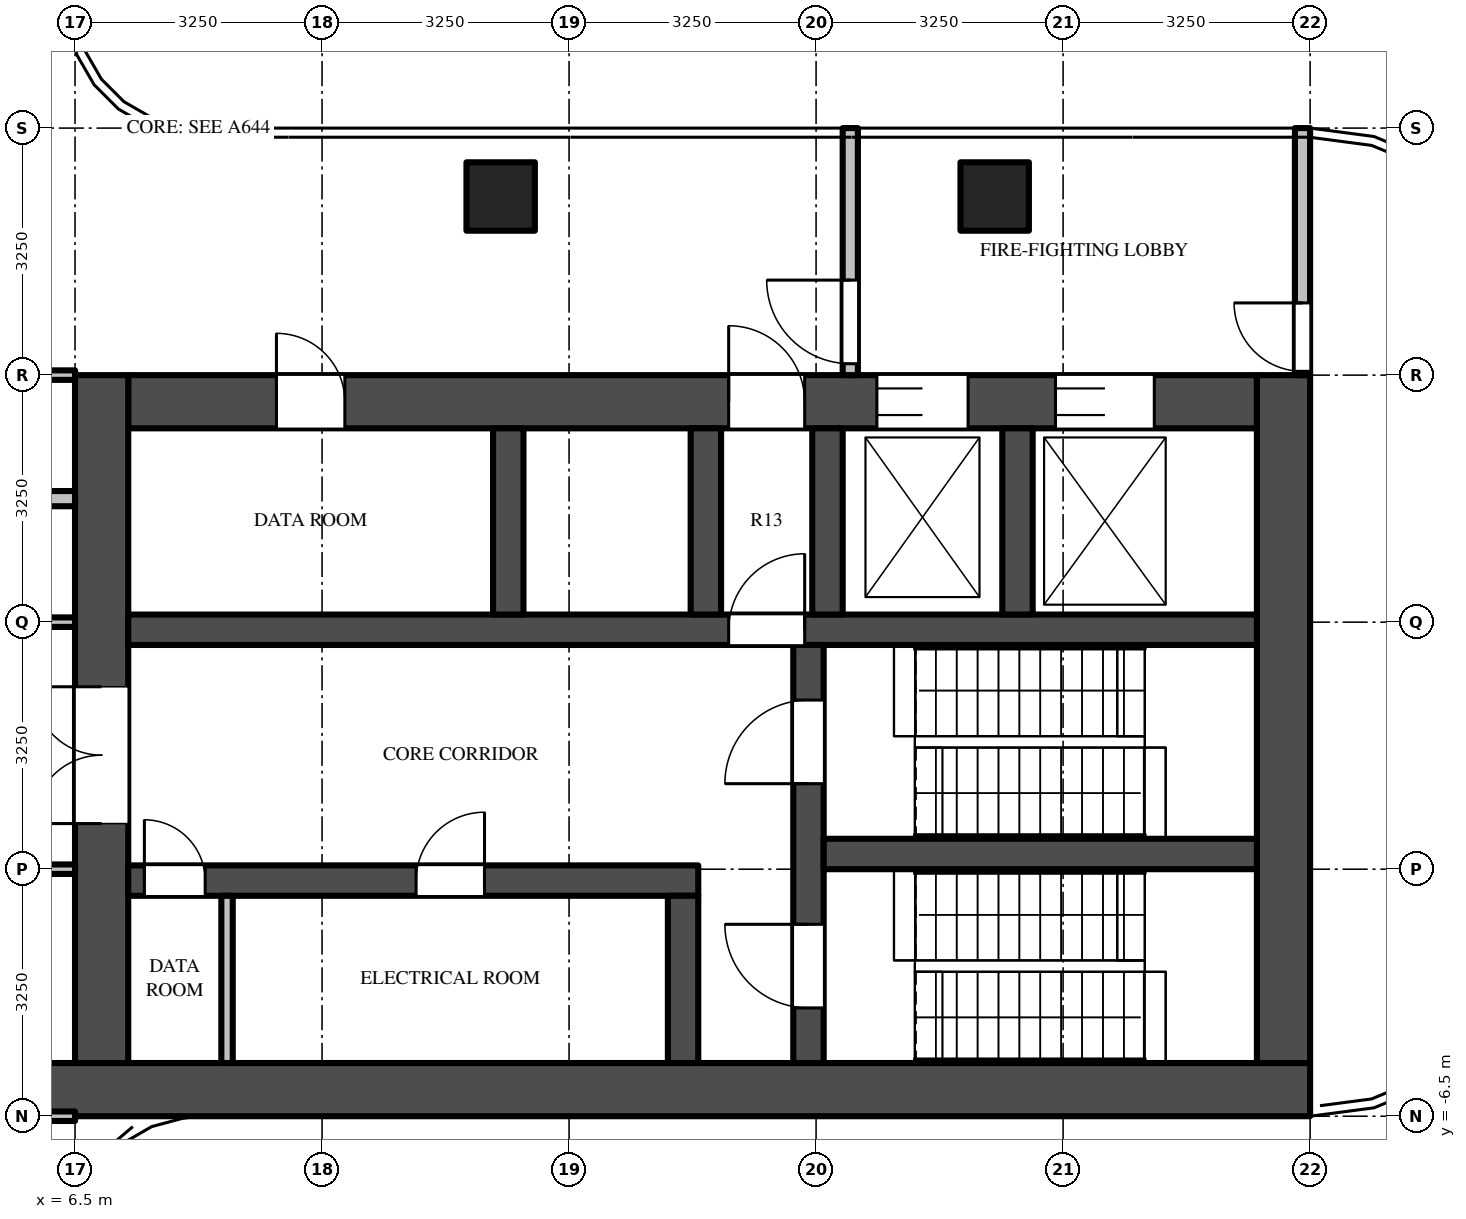
"""IFC4 building model, lengths in metres.
Left out: names, types, materials, properties, quantities, classifications, styles, units other than length and angle.
Written with IfcOpenShell. Run it as: python <this file> out.ifc"""

import sys

from ifc_helpers import new_model, si_unit, direction, frame, frame_2d, origin, origin_2d, place, context, subcontext, project, spatial, rectangle, extrude, source, transform, mapped, element, fill, save


model = new_model("IFC4")
c1 = context("Model", 3, precision=1e-05, world=origin(), true_north=direction((0.0, 1.0)))
c2 = subcontext(c1, "Body", "Model", "MODEL_VIEW")
j1 = project(units=[si_unit("LENGTHUNIT", "METRE"), si_unit("PLANEANGLEUNIT", "RADIAN")], contexts=[c1])
p1 = place(None, origin())
s1 = spatial("IfcSite", under=j1, at=p1, CompositionType="ELEMENT")
p2 = place(p1, origin())
s2 = spatial("IfcBuilding", under=s1, at=p2, CompositionType="ELEMENT")
p3 = place(p2, frame((0.0, 0.0, 330.1)))
s3 = spatial("IfcBuildingStorey", under=s2, at=p3, CompositionType="ELEMENT", Elevation=330.1)
m1 = source(origin(), c2, "Body", "SweptSolid", [
    extrude(rectangle(XDim=0.9, YDim=0.9, at=origin_2d()), origin(), (0.0, 0.0, 1.0), 8.0),
])
for number, where, z_axis, x_axis in (
    (1, (12.1, 5.6, 0.0), (0.0, 0.0, 1.0), (1.0, 0.0, 0.0)),
    (2, (18.6, 5.6, 0.0), (0.0, 0.0, 1.0), (1.0, 0.0, 0.0)),
):
    element("IfcColumn", number, at=place(p3, frame(where, z_axis=z_axis, x_axis=x_axis)), inside=s3, PredefinedType="COLUMN", context=c2, shape_type="MappedRepresentation", body=[
        mapped(m1, transform((0.0, 0.0, 0.0))),
    ])
m2 = source(origin(), c2, "Body", "SweptSolid", [
    extrude(rectangle(XDim=16.7, YDim=0.7, at=frame_2d((8.35, 0.0))), origin(), (0.0, 0.0, 1.0), 7.75),
])
p4 = place(p3, frame((6.05, -6.15, 0.0), z_axis=(0.0, 0.0, 1.0), x_axis=(1.0, 0.0, 0.0)))
e3 = element("IfcWall", 3, at=p4, inside=s3, PredefinedType="SHEAR", context=c2, shape_type="MappedRepresentation", body=[
    mapped(m2, transform((0.0, 0.0, 0.0))),
])
m3 = source(origin(), c2, "Body", "SweptSolid", [
    extrude(rectangle(XDim=14.85, YDim=0.7, at=frame_2d((7.425, 0.0))), origin(), (0.0, 0.0, 1.0), 7.75),
])
p5 = place(p3, frame((7.2, 2.9, 0.0), z_axis=(0.0, 0.0, 1.0), x_axis=(1.0, 0.0, 0.0)))
e4 = element("IfcWall", 4, at=p5, inside=s3, PredefinedType="SHEAR", context=c2, shape_type="MappedRepresentation", body=[
    mapped(m3, transform((0.0, 0.0, 0.0))),
])
m4 = source(origin(), c2, "Body", "SweptSolid", [
    extrude(rectangle(XDim=1.3, YDim=2.1, at=frame_2d((0.65, 1.05))), frame((0.0, 0.36, 0.0), z_axis=(0.0, -1.0, 0.0), x_axis=(1.0, 0.0, 0.0)), (0.0, 0.0, 1.0), 0.72),
])
p6 = place(p5, frame((12.2, 0.0, 0.0)))
e5 = element("IfcOpeningElement", 5, at=p6, cuts=e4, PredefinedType="OPENING", context=c2, shape_type="MappedRepresentation", body=[
    mapped(m4, transform((0.0, 0.0, 0.0))),
])
m5 = source(origin(), c2, "Body", "SweptSolid", [
    extrude(rectangle(XDim=1.2, YDim=2.1, at=frame_2d((0.6, 1.05))), frame((0.0, 0.36, 0.0), z_axis=(0.0, -1.0, 0.0), x_axis=(1.0, 0.0, 0.0)), (0.0, 0.0, 1.0), 0.72),
])
p7 = place(p5, frame((9.85, 0.0, 0.0)))
e6 = element("IfcOpeningElement", 6, at=p7, cuts=e4, PredefinedType="OPENING", context=c2, shape_type="MappedRepresentation", body=[
    mapped(m5, transform((0.0, 0.0, 0.0))),
])
m6 = source(origin(), c2, "Body", "SweptSolid", [
    extrude(rectangle(XDim=1.0, YDim=2.1, at=frame_2d((0.5, 1.05))), frame((0.0, 0.36, 0.0), z_axis=(0.0, -1.0, 0.0), x_axis=(1.0, 0.0, 0.0)), (0.0, 0.0, 1.0), 0.72),
])
p8 = place(p5, frame((7.9, 0.0, 0.0)))
e7 = element("IfcOpeningElement", 7, at=p8, cuts=e4, PredefinedType="OPENING", context=c2, shape_type="MappedRepresentation", body=[
    mapped(m6, transform((0.0, 0.0, 0.0))),
])
m7 = source(origin(), c2, "Body", "SweptSolid", [
    extrude(rectangle(XDim=0.9, YDim=2.1, at=frame_2d((0.45, 1.05))), frame((0.0, 0.36, 0.0), z_axis=(0.0, -1.0, 0.0), x_axis=(1.0, 0.0, 0.0)), (0.0, 0.0, 1.0), 0.72),
])
p9 = place(p5, frame((1.95, 0.0, 0.0)))
e8 = element("IfcOpeningElement", 8, at=p9, cuts=e4, PredefinedType="OPENING", context=c2, shape_type="MappedRepresentation", body=[
    mapped(m7, transform((0.0, 0.0, 0.0))),
])
m8 = source(origin(), c2, "Body", "SweptSolid", [
    extrude(rectangle(XDim=9.05, YDim=0.7, at=frame_2d((4.525, 0.0))), origin(), (0.0, 0.0, 1.0), 7.75),
])
p10 = place(p3, frame((6.85, -5.8, 0.0), z_axis=(0.0, 0.0, 1.0), x_axis=(0.0, 1.0, 0.0)))
e9 = element("IfcWall", 9, at=p10, inside=s3, PredefinedType="SHEAR", context=c2, shape_type="MappedRepresentation", body=[
    mapped(m8, transform((0.0, 0.0, 0.0))),
])
m9 = source(origin(), c2, "Body", "SweptSolid", [
    extrude(rectangle(XDim=1.8, YDim=2.1, at=frame_2d((0.9, 1.05))), frame((0.0, 0.36, 0.0), z_axis=(0.0, -1.0, 0.0), x_axis=(1.0, 0.0, 0.0)), (0.0, 0.0, 1.0), 0.72),
])
p11 = place(p10, frame((3.15, 0.0, 0.0)))
e10 = element("IfcOpeningElement", 10, at=p11, cuts=e9, PredefinedType="OPENING", context=c2, shape_type="MappedRepresentation", body=[
    mapped(m9, transform((0.0, 0.0, 0.0))),
])
p12 = place(p3, frame((22.4, -5.8, 0.0), z_axis=(0.0, 0.0, 1.0), x_axis=(0.0, 1.0, 0.0)))
e11 = element("IfcWall", 11, at=p12, inside=s3, PredefinedType="SHEAR", context=c2, shape_type="MappedRepresentation", body=[
    mapped(m8, transform((0.0, 0.0, 0.0))),
])
m10 = source(origin(), c2, "Body", "SweptSolid", [
    extrude(rectangle(XDim=7.5, YDim=0.4, at=frame_2d((3.75, 0.0))), origin(), (0.0, 0.0, 1.0), 7.75),
])
p13 = place(p3, frame((7.2, -3.4, 0.0), z_axis=(0.0, 0.0, 1.0), x_axis=(1.0, 0.0, 0.0)))
e12 = element("IfcWall", 12, at=p13, inside=s3, PredefinedType="SHEAR", context=c2, shape_type="MappedRepresentation", body=[
    mapped(m10, transform((0.0, 0.0, 0.0))),
])
m11 = source(origin(), c2, "Body", "SweptSolid", [
    extrude(rectangle(XDim=0.8, YDim=2.1, at=frame_2d((0.4, 1.05))), frame((0.0, 0.21, 0.0), z_axis=(0.0, -1.0, 0.0), x_axis=(1.0, 0.0, 0.0)), (0.0, 0.0, 1.0), 0.42),
])
p14 = place(p13, frame((0.212, 0.0, 0.0)))
e13 = element("IfcOpeningElement", 13, at=p14, cuts=e12, PredefinedType="OPENING", context=c2, shape_type="MappedRepresentation", body=[
    mapped(m11, transform((0.0, 0.0, 0.0))),
])
m12 = source(origin(), c2, "Body", "SweptSolid", [
    extrude(rectangle(XDim=0.9, YDim=2.1, at=frame_2d((0.45, 1.05))), frame((0.0, 0.21, 0.0), z_axis=(0.0, -1.0, 0.0), x_axis=(1.0, 0.0, 0.0)), (0.0, 0.0, 1.0), 0.42),
])
p15 = place(p13, frame((3.788, 0.0, 0.0)))
e14 = element("IfcOpeningElement", 14, at=p15, cuts=e12, PredefinedType="OPENING", context=c2, shape_type="MappedRepresentation", body=[
    mapped(m12, transform((0.0, 0.0, 0.0))),
])
m13 = source(origin(), c2, "Body", "SweptSolid", [
    extrude(rectangle(XDim=14.85, YDim=0.4, at=frame_2d((7.425, 0.0))), origin(), (0.0, 0.0, 1.0), 7.75),
])
p16 = place(p3, frame((7.2, -0.1, 0.0), z_axis=(0.0, 0.0, 1.0), x_axis=(1.0, 0.0, 0.0)))
e15 = element("IfcWall", 15, at=p16, inside=s3, PredefinedType="SHEAR", context=c2, shape_type="MappedRepresentation", body=[
    mapped(m13, transform((0.0, 0.0, 0.0))),
])
m14 = source(origin(), c2, "Body", "SweptSolid", [
    extrude(rectangle(XDim=1.0, YDim=2.1, at=frame_2d((0.5, 1.05))), frame((0.0, 0.21, 0.0), z_axis=(0.0, -1.0, 0.0), x_axis=(1.0, 0.0, 0.0)), (0.0, 0.0, 1.0), 0.42),
])
p17 = place(p16, frame((7.9, 0.0, 0.0)))
e16 = element("IfcOpeningElement", 16, at=p17, cuts=e15, PredefinedType="OPENING", context=c2, shape_type="MappedRepresentation", body=[
    mapped(m14, transform((0.0, 0.0, 0.0))),
])
m15 = source(origin(), c2, "Body", "SweptSolid", [
    extrude(rectangle(XDim=5.5, YDim=0.4, at=frame_2d((2.75, 0.0))), origin(), (0.0, 0.0, 1.0), 7.75),
])
p18 = place(p3, frame((16.15, -5.8, 0.0), z_axis=(0.0, 0.0, 1.0), x_axis=(0.0, 1.0, 0.0)))
e17 = element("IfcWall", 17, at=p18, inside=s3, PredefinedType="SHEAR", context=c2, shape_type="MappedRepresentation", body=[
    mapped(m15, transform((0.0, 0.0, 0.0))),
])
m16 = source(origin(), c2, "Body", "SweptSolid", [
    extrude(rectangle(XDim=1.1, YDim=2.1, at=frame_2d((0.55, 1.05))), frame((0.0, 0.21, 0.0), z_axis=(0.0, -1.0, 0.0), x_axis=(1.0, 0.0, 0.0)), (0.0, 0.0, 1.0), 0.42),
])
p19 = place(p18, frame((0.725, 0.0, 0.0)))
e18 = element("IfcOpeningElement", 18, at=p19, cuts=e17, PredefinedType="OPENING", context=c2, shape_type="MappedRepresentation", body=[
    mapped(m16, transform((0.0, 0.0, 0.0))),
])
p20 = place(p18, frame((3.675, 0.0, 0.0)))
e19 = element("IfcOpeningElement", 19, at=p20, cuts=e17, PredefinedType="OPENING", context=c2, shape_type="MappedRepresentation", body=[
    mapped(m16, transform((0.0, 0.0, 0.0))),
])
m17 = source(origin(), c2, "Body", "SweptSolid", [
    extrude(rectangle(XDim=5.7, YDim=0.4, at=frame_2d((2.85, 0.0))), origin(), (0.0, 0.0, 1.0), 7.75),
])
p21 = place(p3, frame((16.35, -3.05, 0.0), z_axis=(0.0, 0.0, 1.0), x_axis=(1.0, 0.0, 0.0)))
e20 = element("IfcWall", 20, at=p21, inside=s3, PredefinedType="SHEAR", context=c2, shape_type="MappedRepresentation", body=[
    mapped(m17, transform((0.0, 0.0, 0.0))),
])
m18 = source(origin(), c2, "Body", "SweptSolid", [
    extrude(rectangle(XDim=2.2, YDim=0.4, at=frame_2d((1.1, 0.0))), origin(), (0.0, 0.0, 1.0), 7.75),
])
p22 = place(p3, frame((14.5, -5.8, 0.0), z_axis=(0.0, 0.0, 1.0), x_axis=(0.0, 1.0, 0.0)))
e21 = element("IfcWall", 21, at=p22, inside=s3, PredefinedType="SHEAR", context=c2, shape_type="MappedRepresentation", body=[
    mapped(m18, transform((0.0, 0.0, 0.0))),
])
m19 = source(origin(), c2, "Body", "SweptSolid", [
    extrude(rectangle(XDim=2.45, YDim=0.4, at=frame_2d((1.225, 0.0))), origin(), (0.0, 0.0, 1.0), 7.75),
])
for number, where, z_axis, x_axis in (
    (22, (12.2, 0.1, 0.0), (0.0, 0.0, 1.0), (0.0, 1.0, 0.0)),
    (23, (14.8, 0.1, 0.0), (0.0, 0.0, 1.0), (0.0, 1.0, 0.0)),
    (24, (16.4, 0.1, 0.0), (0.0, 0.0, 1.0), (0.0, 1.0, 0.0)),
    (25, (18.9, 0.1, 0.0), (0.0, 0.0, 1.0), (0.0, 1.0, 0.0)),
):
    element("IfcWall", number, at=place(p3, frame(where, z_axis=z_axis, x_axis=x_axis)), inside=s3, PredefinedType="SHEAR", context=c2, shape_type="MappedRepresentation", body=[
        mapped(m19, transform((0.0, 0.0, 0.0))),
    ])
m20 = source(origin(), c2, "Body", "SweptSolid", [
    extrude(rectangle(XDim=3.25, YDim=0.2, at=frame_2d((1.625, 0.0))), origin(), (0.0, 0.0, 1.0), 7.75),
])
p23 = place(p3, frame((16.7, 3.25, 0.0), z_axis=(0.0, 0.0, 1.0), x_axis=(0.0, 1.0, 0.0)))
e26 = element("IfcWall", 26, at=p23, inside=s3, PredefinedType="PARTITIONING", context=c2, shape_type="MappedRepresentation", body=[
    mapped(m20, transform((0.0, 0.0, 0.0))),
])
m21 = source(origin(), c2, "Body", "SweptSolid", [
    extrude(rectangle(XDim=1.1, YDim=2.1, at=frame_2d((0.55, 1.05))), frame((0.0, 0.11, 0.0), z_axis=(0.0, -1.0, 0.0), x_axis=(1.0, 0.0, 0.0)), (0.0, 0.0, 1.0), 0.22),
])
p24 = place(p23, frame((0.15, 0.0, 0.0)))
e27 = element("IfcOpeningElement", 27, at=p24, cuts=e26, PredefinedType="OPENING", context=c2, shape_type="MappedRepresentation", body=[
    mapped(m21, transform((0.0, 0.0, 0.0))),
])
p25 = place(p3, frame((22.65, 3.25, 0.0), z_axis=(0.0, 0.0, 1.0), x_axis=(0.0, 1.0, 0.0)))
e28 = element("IfcWall", 28, at=p25, inside=s3, PredefinedType="PARTITIONING", context=c2, shape_type="MappedRepresentation", body=[
    mapped(m20, transform((0.0, 0.0, 0.0))),
])
m22 = source(origin(), c2, "Body", "SweptSolid", [
    extrude(rectangle(XDim=0.9, YDim=2.1, at=frame_2d((0.45, 1.05))), frame((0.0, 0.11, 0.0), z_axis=(0.0, -1.0, 0.0), x_axis=(1.0, 0.0, 0.0)), (0.0, 0.0, 1.0), 0.22),
])
p26 = place(p25, frame((0.05, 0.0, 0.0)))
e29 = element("IfcOpeningElement", 29, at=p26, cuts=e28, PredefinedType="OPENING", context=c2, shape_type="MappedRepresentation", body=[
    mapped(m22, transform((0.0, 0.0, 0.0))),
])
m23 = source(origin(), c2, "Body", "SweptSolid", [
    extrude(rectangle(XDim=2.2, YDim=0.15, at=frame_2d((1.1, 0.0))), origin(), (0.0, 0.0, 1.0), 7.75),
])
p27 = place(p3, frame((8.5, -5.8, 0.0), z_axis=(0.0, 0.0, 1.0), x_axis=(0.0, 1.0, 0.0)))
e30 = element("IfcWall", 30, at=p27, inside=s3, PredefinedType="PARTITIONING", context=c2, shape_type="MappedRepresentation", body=[
    mapped(m23, transform((0.0, 0.0, 0.0))),
])
m24 = source(origin(), c2, "Body", "SweptSolid", [
    extrude(rectangle(XDim=5.363, YDim=0.125, at=frame_2d((2.681, 0.0))), origin(), (0.0, 0.0, 1.0), 6.83),
])
p28 = place(p3, frame((6.5, -6.5, 0.0), z_axis=(0.0, 0.0, 1.0), x_axis=(-1.0, 0.0, 0.0)))
e31 = element("IfcWall", 31, at=p28, inside=s3, PredefinedType="PARTITIONING", context=c2, shape_type="MappedRepresentation", body=[
    mapped(m24, transform((0.0, 0.0, 0.0))),
])
m25 = source(origin(), c2, "Body", "SweptSolid", [
    extrude(rectangle(XDim=5.363, YDim=0.125, at=frame_2d((2.681, 0.0))), origin(), (0.0, 0.0, 1.0), 7.046),
])
p29 = place(p3, frame((6.5, -3.25, 0.0), z_axis=(0.0, 0.0, 1.0), x_axis=(-1.0, 0.0, 0.0)))
e32 = element("IfcWall", 32, at=p29, inside=s3, PredefinedType="PARTITIONING", context=c2, shape_type="MappedRepresentation", body=[
    mapped(m25, transform((0.0, 0.0, 0.0))),
])
m26 = source(origin(), c2, "Body", "SweptSolid", [
    extrude(rectangle(XDim=1.0, YDim=2.1, at=frame_2d((0.5, 1.05))), frame((0.0, 0.073, 0.0), z_axis=(0.0, -1.0, 0.0), x_axis=(1.0, 0.0, 0.0)), (0.0, 0.0, 1.0), 0.145),
])
p30 = place(p29, frame((0.35, 0.0, 0.0)))
e33 = element("IfcOpeningElement", 33, at=p30, cuts=e32, PredefinedType="OPENING", context=c2, shape_type="MappedRepresentation", body=[
    mapped(m26, transform((0.0, 0.0, 0.0))),
])
p31 = place(p3, frame((1.137, 0.0, 0.0), z_axis=(0.0, 0.0, 1.0), x_axis=(1.0, 0.0, 0.0)))
e34 = element("IfcWall", 34, at=p31, inside=s3, PredefinedType="PARTITIONING", context=c2, shape_type="MappedRepresentation", body=[
    mapped(m25, transform((0.0, 0.0, 0.0))),
])
p32 = place(p31, frame((0.413, 0.0, 0.0)))
e35 = element("IfcOpeningElement", 35, at=p32, cuts=e34, PredefinedType="OPENING", context=c2, shape_type="MappedRepresentation", body=[
    mapped(m26, transform((0.0, 0.0, 0.0))),
])
p33 = place(p3, frame((1.262, 1.625, 0.0), z_axis=(0.0, 0.0, 1.0), x_axis=(1.0, 0.0, 0.0)))
e36 = element("IfcWall", 36, at=p33, inside=s3, PredefinedType="PARTITIONING", context=c2, shape_type="SweptSolid", body=[
    extrude(rectangle(XDim=5.238, YDim=0.2, at=frame_2d((2.619, 0.0))), origin(), (0.0, 0.0, 1.0), 7.046),
])
p34 = place(p3, frame((1.137, 3.25, 0.0), z_axis=(0.0, 0.0, 1.0), x_axis=(1.0, 0.0, 0.0)))
e37 = element("IfcWall", 37, at=p34, inside=s3, PredefinedType="PARTITIONING", context=c2, shape_type="MappedRepresentation", body=[
    mapped(m25, transform((0.0, 0.0, 0.0))),
])
p35 = place(p34, frame((0.413, 0.0, 0.0)))
e38 = element("IfcOpeningElement", 38, at=p35, cuts=e37, PredefinedType="OPENING", context=c2, shape_type="MappedRepresentation", body=[
    mapped(m26, transform((0.0, 0.0, 0.0))),
])
m27 = source(origin(), c2, "Body", "SweptSolid", [
    extrude(rectangle(XDim=1.3, YDim=2.1, at=frame_2d((0.65, 1.05))), frame((0.0, -0.275, 0.0), z_axis=(0.0, -1.0, 0.0), x_axis=(1.0, 0.0, 0.0)), (0.0, 0.0, 1.0), 0.05),
])
p36 = place(p6, origin())
e39 = element("IfcDoor", 39, at=p36, inside=s3, OperationType="DOUBLE_DOOR_SLIDING", PredefinedType="DOOR", context=c2, shape_type="MappedRepresentation", body=[
    mapped(m27, transform((0.0, 0.0, 0.0))),
])
fill(e5, e39)
m28 = source(origin(), c2, "Body", "SweptSolid", [
    extrude(rectangle(XDim=1.2, YDim=2.1, at=frame_2d((0.6, 1.05))), frame((0.0, -0.275, 0.0), z_axis=(0.0, -1.0, 0.0), x_axis=(1.0, 0.0, 0.0)), (0.0, 0.0, 1.0), 0.05),
])
p37 = place(p7, origin())
e40 = element("IfcDoor", 40, at=p37, inside=s3, OperationType="DOUBLE_DOOR_SLIDING", PredefinedType="DOOR", context=c2, shape_type="MappedRepresentation", body=[
    mapped(m28, transform((0.0, 0.0, 0.0))),
])
fill(e6, e40)
m29 = source(origin(), c2, "Body", "SweptSolid", [
    extrude(rectangle(XDim=1.8, YDim=2.1, at=frame_2d((0.9, 1.05))), frame((0.0, -0.275, 0.0), z_axis=(0.0, -1.0, 0.0), x_axis=(1.0, 0.0, 0.0)), (0.0, 0.0, 1.0), 0.05),
])
p38 = place(p11, origin())
e41 = element("IfcDoor", 41, at=p38, inside=s3, OperationType="DOUBLE_DOOR_SINGLE_SWING", PredefinedType="DOOR", context=c2, shape_type="MappedRepresentation", body=[
    mapped(m29, transform((0.0, 0.0, 0.0))),
])
fill(e10, e41)
m30 = source(origin(), c2, "Body", "SweptSolid", [
    extrude(rectangle(XDim=1.1, YDim=2.1, at=frame_2d((0.55, 1.05))), frame((0.0, 0.025, 0.0), z_axis=(0.0, -1.0, 0.0), x_axis=(1.0, 0.0, 0.0)), (0.0, 0.0, 1.0), 0.05),
])
p39 = place(p19, origin())
e42 = element("IfcDoor", 42, at=p39, inside=s3, OperationType="SINGLE_SWING_RIGHT", PredefinedType="DOOR", context=c2, shape_type="MappedRepresentation", body=[
    mapped(m30, transform((0.0, 0.0, 0.0))),
])
fill(e18, e42)
p40 = place(p20, origin())
e43 = element("IfcDoor", 43, at=p40, inside=s3, OperationType="SINGLE_SWING_LEFT", PredefinedType="DOOR", context=c2, shape_type="MappedRepresentation", body=[
    mapped(m30, transform((0.0, 0.0, 0.0))),
])
fill(e19, e43)
m31 = source(origin(), c2, "Body", "SweptSolid", [
    extrude(rectangle(XDim=1.0, YDim=2.1, at=frame_2d((0.5, 1.05))), frame((0.0, 0.025, 0.0), z_axis=(0.0, -1.0, 0.0), x_axis=(1.0, 0.0, 0.0)), (0.0, 0.0, 1.0), 0.05),
])
p41 = place(p17, origin())
e44 = element("IfcDoor", 44, at=p41, inside=s3, OperationType="SINGLE_SWING_RIGHT", PredefinedType="DOOR", context=c2, shape_type="MappedRepresentation", body=[
    mapped(m31, transform((0.0, 0.0, 0.0))),
])
fill(e16, e44)
m32 = source(origin(), c2, "Body", "SweptSolid", [
    extrude(rectangle(XDim=1.0, YDim=2.1, at=frame_2d((0.5, 1.05))), frame((0.0, -0.275, 0.0), z_axis=(0.0, -1.0, 0.0), x_axis=(1.0, 0.0, 0.0)), (0.0, 0.0, 1.0), 0.05),
])
p42 = place(p8, origin())
e45 = element("IfcDoor", 45, at=p42, inside=s3, OperationType="SINGLE_SWING_LEFT", PredefinedType="DOOR", context=c2, shape_type="MappedRepresentation", body=[
    mapped(m32, transform((0.0, 0.0, 0.0))),
])
fill(e7, e45)
p43 = place(p24, origin())
e46 = element("IfcDoor", 46, at=p43, inside=s3, OperationType="SINGLE_SWING_RIGHT", PredefinedType="DOOR", context=c2, shape_type="MappedRepresentation", body=[
    mapped(m30, transform((0.0, 0.0, 0.0))),
])
fill(e27, e46)
m33 = source(origin(), c2, "Body", "SweptSolid", [
    extrude(rectangle(XDim=0.9, YDim=2.1, at=frame_2d((0.45, 1.05))), frame((0.0, 0.025, 0.0), z_axis=(0.0, -1.0, 0.0), x_axis=(1.0, 0.0, 0.0)), (0.0, 0.0, 1.0), 0.05),
])
p44 = place(p26, origin())
e47 = element("IfcDoor", 47, at=p44, inside=s3, OperationType="SINGLE_SWING_RIGHT", PredefinedType="DOOR", context=c2, shape_type="MappedRepresentation", body=[
    mapped(m33, transform((0.0, 0.0, 0.0))),
])
fill(e29, e47)
m34 = source(origin(), c2, "Body", "SweptSolid", [
    extrude(rectangle(XDim=0.8, YDim=2.1, at=frame_2d((0.4, 1.05))), frame((0.0, 0.025, 0.0), z_axis=(0.0, -1.0, 0.0), x_axis=(1.0, 0.0, 0.0)), (0.0, 0.0, 1.0), 0.05),
])
p45 = place(p14, origin())
e48 = element("IfcDoor", 48, at=p45, inside=s3, OperationType="SINGLE_SWING_LEFT", PredefinedType="DOOR", context=c2, shape_type="MappedRepresentation", body=[
    mapped(m34, transform((0.0, 0.0, 0.0))),
])
fill(e13, e48)
p46 = place(p15, origin())
e49 = element("IfcDoor", 49, at=p46, inside=s3, OperationType="SINGLE_SWING_RIGHT", PredefinedType="DOOR", context=c2, shape_type="MappedRepresentation", body=[
    mapped(m33, transform((0.0, 0.0, 0.0))),
])
fill(e14, e49)
m35 = source(origin(), c2, "Body", "SweptSolid", [
    extrude(rectangle(XDim=0.9, YDim=2.1, at=frame_2d((0.45, 1.05))), frame((0.0, -0.275, 0.0), z_axis=(0.0, -1.0, 0.0), x_axis=(1.0, 0.0, 0.0)), (0.0, 0.0, 1.0), 0.05),
])
p47 = place(p9, origin())
e50 = element("IfcDoor", 50, at=p47, inside=s3, OperationType="SINGLE_SWING_LEFT", PredefinedType="DOOR", context=c2, shape_type="MappedRepresentation", body=[
    mapped(m35, transform((0.0, 0.0, 0.0))),
])
fill(e8, e50)
save(model, sys.argv[1])
